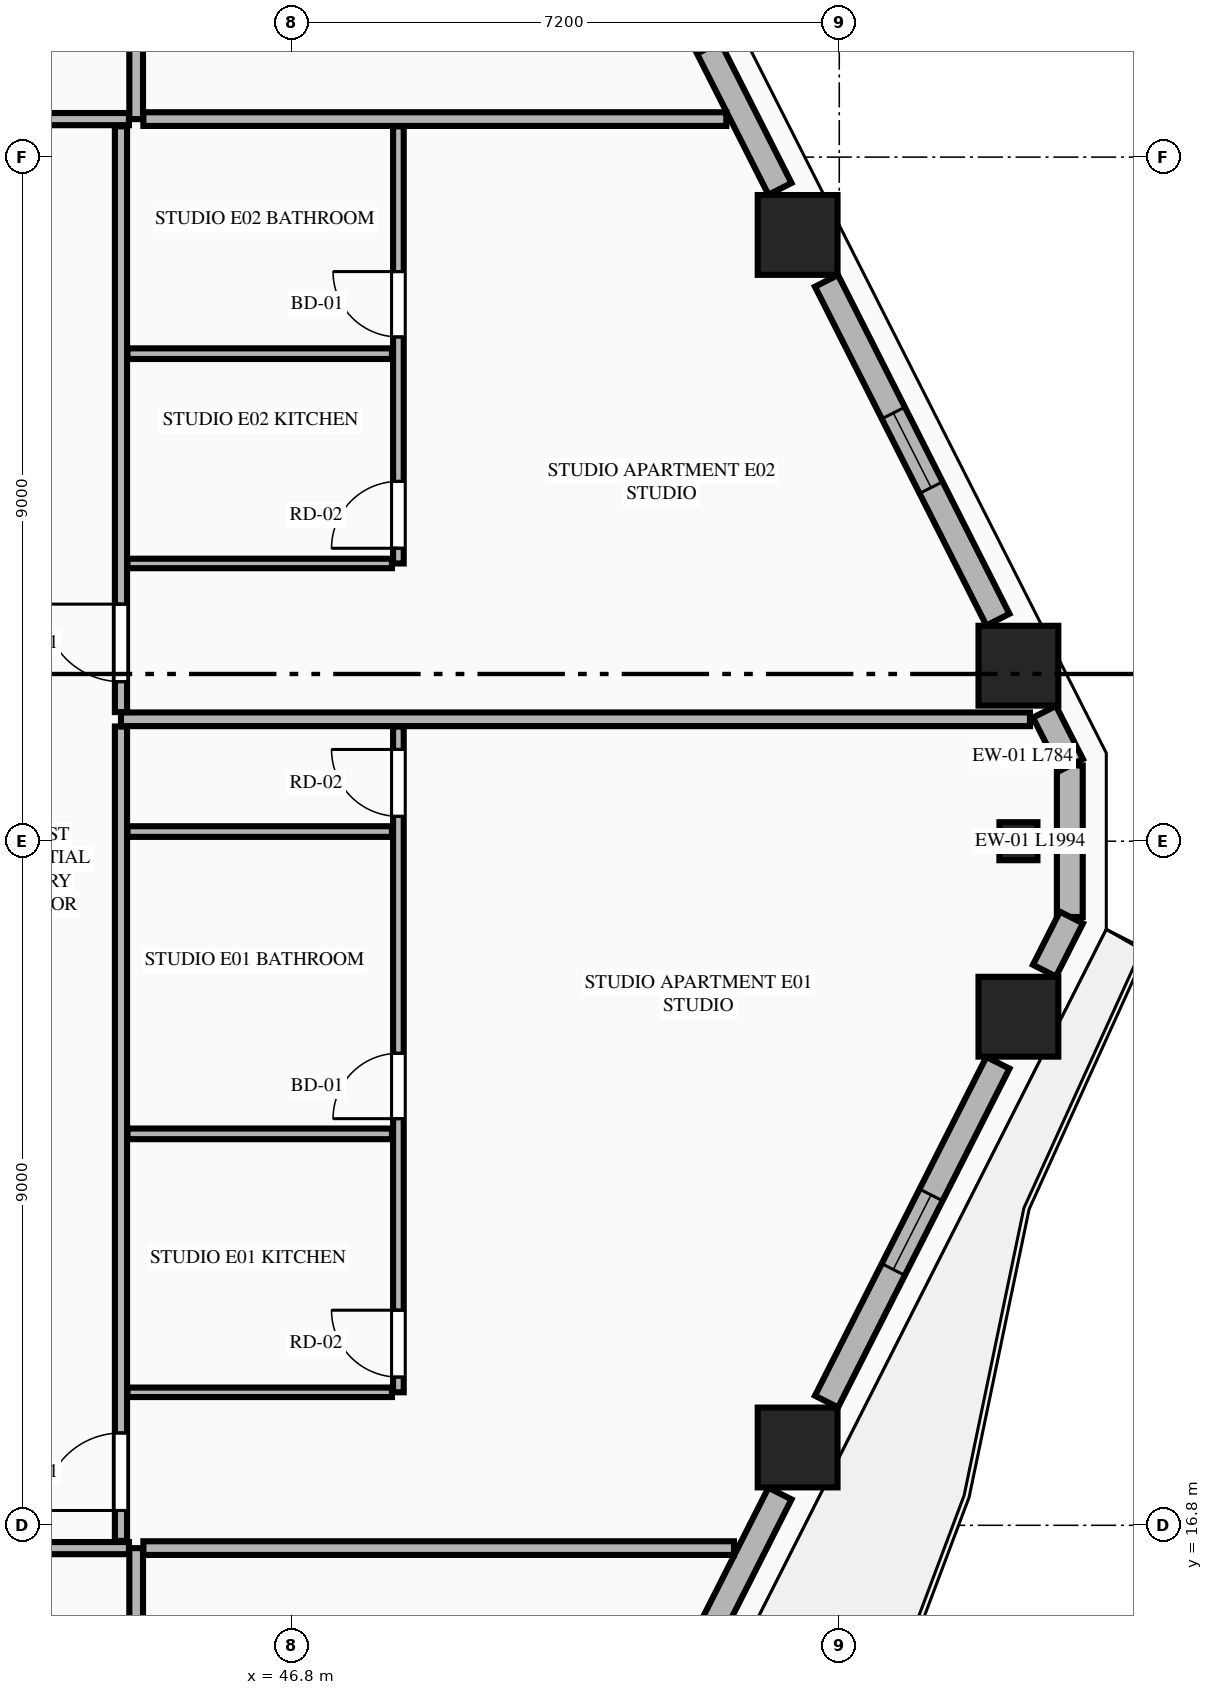
"""IFC4 building model, lengths in metres.
Left out: names, types, materials, properties, quantities, classifications, styles, units other than length and angle.
Written with IfcOpenShell. Run it as: python <this file> out.ifc"""

import sys

from ifc_helpers import new_model, si_unit, direction, frame, frame_2d, origin, origin_2d, place, context, subcontext, project, spatial, rectangle, extrude, element, fill, save


model = new_model("IFC4")
c1 = context("Model", 3, precision=1e-05, world=origin(), true_north=direction((0.0, 1.0)))
c2 = subcontext(c1, "Body", "Model", "MODEL_VIEW")
j1 = project(units=[si_unit("LENGTHUNIT", "METRE"), si_unit("PLANEANGLEUNIT", "RADIAN")], contexts=[c1])
p1 = place(None, origin())
s1 = spatial("IfcSite", under=j1, at=p1, CompositionType="ELEMENT")
p2 = place(p1, origin())
s2 = spatial("IfcBuilding", under=s1, at=p2, CompositionType="ELEMENT")
p3 = place(p2, frame((0.0, 0.0, 141.0)))
s3 = spatial("IfcBuildingStorey", under=s2, at=p3, CompositionType="ELEMENT", Elevation=141.0)
for number, where, z_axis, x_axis in (
    (1, (53.452, 17.824, 0.0), (0.0, 0.0, 1.0), (1.0, 0.0, 0.0)),
    (2, (56.357, 23.491, 0.0), (0.0, 0.0, 1.0), (1.0, 0.0, 0.0)),
    (3, (56.357, 28.109, 0.0), (0.0, 0.0, 1.0), (1.0, 0.0, 0.0)),
    (4, (53.452, 33.776, 0.0), (0.0, 0.0, 1.0), (1.0, 0.0, 0.0)),
):
    element("IfcColumn", number, at=place(p3, frame(where, z_axis=z_axis, x_axis=x_axis)), inside=s3, PredefinedType="COLUMN", context=c2, shape_type="SweptSolid", body=[
        extrude(rectangle(XDim=1.05, YDim=1.05, at=origin_2d()), origin(), (0.0, 0.0, 1.0), 3.55),
    ])
p4 = place(p3, frame((56.357, 25.8, 0.0), z_axis=(0.0, 0.0, 1.0), x_axis=(0.0, 1.0, 0.0)))
e5 = element("IfcColumn", 5, at=p4, inside=s3, PredefinedType="PILASTER", context=c2, shape_type="SweptSolid", body=[
    extrude(rectangle(XDim=0.5, YDim=0.35, at=origin_2d()), origin(), (0.0, 0.0, 1.0), 3.55),
])
p5 = place(p3, frame((57.033, 24.803, 0.0), z_axis=(0.0, 0.0, 1.0), x_axis=(0.0, 1.0, 0.0)))
e6 = element("IfcWall", 6, at=p5, inside=s3, PredefinedType="STANDARD", context=c2, shape_type="SweptSolid", body=[
    extrude(rectangle(XDim=1.994, YDim=0.34, at=frame_2d((0.997, 0.0))), origin(), (0.0, 0.0, 1.0), 3.34),
])
p6 = place(p3, frame((50.863, 12.561, 0.0), z_axis=(0.0, 0.0, 1.0), x_axis=(0.451567731634, 0.892236842855, 0.0)))
e7 = element("IfcWall", 7, at=p6, inside=s3, PredefinedType="STANDARD", context=c2, shape_type="SweptSolid", body=[
    extrude(rectangle(XDim=5.219, YDim=0.34, at=frame_2d((2.61, 0.0))), origin(), (0.0, 0.0, 1.0), 2.797),
])
p7 = place(p6, frame((1.532, 0.0, 0.0)))
e8 = element("IfcOpeningElement", 8, at=p7, cuts=e7, PredefinedType="OPENING", context=c2, shape_type="SweptSolid", body=[
    extrude(rectangle(XDim=1.1, YDim=2.25, at=frame_2d((0.55, 1.125))), frame((0.0, 0.18, 0.0), z_axis=(0.0, -1.0, 0.0), x_axis=(1.0, 0.0, 0.0)), (0.0, 0.0, 1.0), 0.36),
])
p8 = place(p3, frame((53.832, 18.428, 0.0), z_axis=(0.0, 0.0, 1.0), x_axis=(0.451431617681, 0.892305718102, 0.0)))
e9 = element("IfcWall", 9, at=p8, inside=s3, PredefinedType="STANDARD", context=c2, shape_type="SweptSolid", body=[
    extrude(rectangle(XDim=4.995, YDim=0.34, at=frame_2d((2.498, 0.0))), origin(), (0.0, 0.0, 1.0), 2.797),
])
p9 = place(p8, frame((1.947, 0.0, 0.75)))
e10 = element("IfcOpeningElement", 10, at=p9, cuts=e9, PredefinedType="OPENING", context=c2, shape_type="SweptSolid", body=[
    extrude(rectangle(XDim=1.1, YDim=1.897, at=frame_2d((0.55, 0.948))), frame((0.0, 0.18, 0.0), z_axis=(0.0, -1.0, 0.0), x_axis=(1.0, 0.0, 0.0)), (0.0, 0.0, 1.0), 0.36),
])
for number, where, z_axis, x_axis in (
    (11, (56.7, 24.097, 0.0), (0.0, 0.0, 1.0), (0.452, 0.892, 0.0)),
    (12, (57.054, 26.804, 0.0), (0.0, 0.0, 1.0), (-0.452, 0.892, 0.0)),
):
    element("IfcWall", number, at=place(p3, frame(where, z_axis=z_axis, x_axis=x_axis)), inside=s3, PredefinedType="STANDARD", context=c2, shape_type="SweptSolid", body=[
        extrude(rectangle(XDim=0.783, YDim=0.34, at=frame_2d((0.392, 0.0))), origin(), (0.0, 0.0, 1.0), 3.34),
    ])
p10 = place(p3, frame((56.087, 28.715, 0.0), z_axis=(0.0, 0.0, 1.0), x_axis=(-0.451431617681, 0.892305718102, 0.0)))
e13 = element("IfcWall", 13, at=p10, inside=s3, PredefinedType="STANDARD", context=c2, shape_type="SweptSolid", body=[
    extrude(rectangle(XDim=4.995, YDim=0.34, at=frame_2d((2.498, 0.0))), origin(), (0.0, 0.0, 1.0), 2.797),
])
p11 = place(p10, frame((1.947, 0.0, 0.75)))
e14 = element("IfcOpeningElement", 14, at=p11, cuts=e13, PredefinedType="OPENING", context=c2, shape_type="SweptSolid", body=[
    extrude(rectangle(XDim=1.1, YDim=1.897, at=frame_2d((0.55, 0.948))), frame((0.0, 0.18, 0.0), z_axis=(0.0, -1.0, 0.0), x_axis=(1.0, 0.0, 0.0)), (0.0, 0.0, 1.0), 0.36),
])
p12 = place(p3, frame((53.22, 34.382, 0.0), z_axis=(0.0, 0.0, 1.0), x_axis=(-0.451567731634, 0.892236842855, 0.0)))
e15 = element("IfcWall", 15, at=p12, inside=s3, PredefinedType="STANDARD", context=c2, shape_type="SweptSolid", body=[
    extrude(rectangle(XDim=5.219, YDim=0.34, at=frame_2d((2.61, 0.0))), origin(), (0.0, 0.0, 1.0), 2.797),
])
p13 = place(p12, frame((2.06, 0.0, 0.75)))
e16 = element("IfcOpeningElement", 16, at=p13, cuts=e15, PredefinedType="OPENING", context=c2, shape_type="SweptSolid", body=[
    extrude(rectangle(XDim=1.1, YDim=1.897, at=frame_2d((0.55, 0.948))), frame((0.0, 0.18, 0.0), z_axis=(0.0, -1.0, 0.0), x_axis=(1.0, 0.0, 0.0)), (0.0, 0.0, 1.0), 0.36),
])
p14 = place(p3, frame((44.75, 4.105, 0.0), z_axis=(0.0, 0.0, 1.0), x_axis=(0.0, 1.0, 0.0)))
e17 = element("IfcWall", 17, at=p14, inside=s3, PredefinedType="PARTITIONING", context=c2, shape_type="SweptSolid", body=[
    extrude(rectangle(XDim=12.395, YDim=0.18, at=frame_2d((6.198, 0.0))), origin(), (0.0, 0.0, 1.0), 3.34),
])
p15 = place(p3, frame((20.145, 16.5, 0.0), z_axis=(0.0, 0.0, 1.0), x_axis=(1.0, 0.0, 0.0)))
e18 = element("IfcWall", 18, at=p15, inside=s3, PredefinedType="PARTITIONING", context=c2, shape_type="SweptSolid", body=[
    extrude(rectangle(XDim=24.51, YDim=0.16, at=frame_2d((12.255, 0.0))), origin(), (0.0, 0.0, 1.0), 3.34),
])
p16 = place(p15, frame((0.405, 0.0, 0.0)))
e19 = element("IfcOpeningElement", 19, at=p16, cuts=e18, PredefinedType="OPENING", context=c2, shape_type="SweptSolid", body=[
    extrude(rectangle(XDim=1.35, YDim=2.35, at=frame_2d((0.675, 1.175))), frame((0.0, 0.09, 0.0), z_axis=(0.0, -1.0, 0.0), x_axis=(1.0, 0.0, 0.0)), (0.0, 0.0, 1.0), 0.18),
])
p17 = place(p3, frame((44.75, 35.3, 0.0), z_axis=(0.0, 0.0, 1.0), x_axis=(0.0, 1.0, 0.0)))
e20 = element("IfcWall", 20, at=p17, inside=s3, PredefinedType="PARTITIONING", context=c2, shape_type="SweptSolid", body=[
    extrude(rectangle(XDim=12.195, YDim=0.18, at=frame_2d((6.098, 0.0))), origin(), (0.0, 0.0, 1.0), 3.34),
])
p18 = place(p3, frame((20.145, 35.3, 0.0), z_axis=(0.0, 0.0, 1.0), x_axis=(1.0, 0.0, 0.0)))
e21 = element("IfcWall", 21, at=p18, inside=s3, PredefinedType="PARTITIONING", context=c2, shape_type="SweptSolid", body=[
    extrude(rectangle(XDim=24.51, YDim=0.16, at=frame_2d((12.255, 0.0))), origin(), (0.0, 0.0, 1.0), 3.34),
])
p19 = place(p18, frame((0.405, 0.0, 0.0)))
e22 = element("IfcOpeningElement", 22, at=p19, cuts=e21, PredefinedType="OPENING", context=c2, shape_type="SweptSolid", body=[
    extrude(rectangle(XDim=1.35, YDim=2.35, at=frame_2d((0.675, 1.175))), frame((0.0, 0.09, 0.0), z_axis=(0.0, -1.0, 0.0), x_axis=(1.0, 0.0, 0.0)), (0.0, 0.0, 1.0), 0.18),
])
p20 = place(p3, frame((44.845, 16.5, 0.0), z_axis=(0.0, 0.0, 1.0), x_axis=(1.0, 0.0, 0.0)))
e23 = element("IfcWall", 23, at=p20, inside=s3, PredefinedType="PARTITIONING", context=c2, shape_type="SweptSolid", body=[
    extrude(rectangle(XDim=7.77, YDim=0.18, at=frame_2d((3.885, 0.0))), origin(), (0.0, 0.0, 1.0), 3.34),
])
p21 = place(p3, frame((44.845, 35.3, 0.0), z_axis=(0.0, 0.0, 1.0), x_axis=(1.0, 0.0, 0.0)))
e24 = element("IfcWall", 24, at=p21, inside=s3, PredefinedType="PARTITIONING", context=c2, shape_type="SweptSolid", body=[
    extrude(rectangle(XDim=7.669, YDim=0.18, at=frame_2d((3.834, 0.0))), origin(), (0.0, 0.0, 1.0), 3.34),
])
p22 = place(p3, frame((44.55, 16.595, 0.0), z_axis=(0.0, 0.0, 1.0), x_axis=(0.0, 1.0, 0.0)))
e25 = element("IfcWall", 25, at=p22, inside=s3, PredefinedType="PARTITIONING", context=c2, shape_type="SweptSolid", body=[
    extrude(rectangle(XDim=10.714, YDim=0.16, at=frame_2d((5.357, 0.0))), origin(), (0.0, 0.0, 1.0), 3.34),
])
p23 = place(p22, frame((0.4, 0.0, 0.0)))
e26 = element("IfcOpeningElement", 26, at=p23, cuts=e25, PredefinedType="OPENING", context=c2, shape_type="SweptSolid", body=[
    extrude(rectangle(XDim=1.02, YDim=2.25, at=frame_2d((0.51, 1.125))), frame((0.0, 0.09, 0.0), z_axis=(0.0, -1.0, 0.0), x_axis=(1.0, 0.0, 0.0)), (0.0, 0.0, 1.0), 0.18),
])
p24 = place(p3, frame((44.635, 18.55, 0.0), z_axis=(0.0, 0.0, 1.0), x_axis=(1.0, 0.0, 0.0)))
e27 = element("IfcWall", 27, at=p24, inside=s3, PredefinedType="PARTITIONING", context=c2, shape_type="SweptSolid", body=[
    extrude(rectangle(XDim=3.48, YDim=0.125, at=frame_2d((1.74, 0.0))), origin(), (0.0, 0.0, 1.0), 2.722),
])
p25 = place(p3, frame((48.2, 18.55, 0.0), z_axis=(0.0, 0.0, 1.0), x_axis=(0.0, 1.0, 0.0)))
e28 = element("IfcWall", 28, at=p25, inside=s3, PredefinedType="PLUMBINGWALL", context=c2, shape_type="SweptSolid", body=[
    extrude(rectangle(XDim=8.759, YDim=0.14, at=frame_2d((4.379, 0.0))), origin(), (0.0, 0.0, 1.0), 3.34),
])
p26 = place(p25, frame((3.6, 0.0, 0.0)))
e29 = element("IfcOpeningElement", 29, at=p26, cuts=e28, PredefinedType="OPENING", context=c2, shape_type="SweptSolid", body=[
    extrude(rectangle(XDim=0.86, YDim=2.1, at=frame_2d((0.43, 1.05))), frame((0.0, 0.08, 0.0), z_axis=(0.0, -1.0, 0.0), x_axis=(1.0, 0.0, 0.0)), (0.0, 0.0, 1.0), 0.16),
])
p27 = place(p25, frame((7.577, 0.0, 0.0)))
e30 = element("IfcOpeningElement", 30, at=p27, cuts=e28, PredefinedType="OPENING", context=c2, shape_type="SweptSolid", body=[
    extrude(rectangle(XDim=0.88, YDim=2.15, at=frame_2d((0.44, 1.075))), frame((0.0, 0.08, 0.0), z_axis=(0.0, -1.0, 0.0), x_axis=(1.0, 0.0, 0.0)), (0.0, 0.0, 1.0), 0.16),
])
p28 = place(p25, frame((0.2, 0.0, 0.0)))
e31 = element("IfcOpeningElement", 31, at=p28, cuts=e28, PredefinedType="OPENING", context=c2, shape_type="SweptSolid", body=[
    extrude(rectangle(XDim=0.88, YDim=2.15, at=frame_2d((0.44, 1.075))), frame((0.0, 0.08, 0.0), z_axis=(0.0, -1.0, 0.0), x_axis=(1.0, 0.0, 0.0)), (0.0, 0.0, 1.0), 0.16),
])
for number, where, z_axis, x_axis in (
    (32, (44.635, 21.95, 0.0), (0.0, 0.0, 1.0), (1.0, 0.0, 0.0)),
    (33, (44.635, 25.927, 0.0), (0.0, 0.0, 1.0), (1.0, 0.0, 0.0)),
):
    element("IfcWall", number, at=place(p3, frame(where, z_axis=z_axis, x_axis=x_axis)), inside=s3, PredefinedType="PLUMBINGWALL", context=c2, shape_type="SweptSolid", body=[
        extrude(rectangle(XDim=3.48, YDim=0.14, at=frame_2d((1.74, 0.0))), origin(), (0.0, 0.0, 1.0), 3.34),
    ])
p29 = place(p3, frame((44.55, 27.404, 0.0), z_axis=(0.0, 0.0, 1.0), x_axis=(1.0, 0.0, 0.0)))
e34 = element("IfcWall", 34, at=p29, inside=s3, PredefinedType="PARTITIONING", context=c2, shape_type="SweptSolid", body=[
    extrude(rectangle(XDim=11.959, YDim=0.18, at=frame_2d((5.979, 0.0))), origin(), (0.0, 0.0, 1.0), 3.34),
])
p30 = place(p3, frame((44.55, 27.499, 0.0), z_axis=(0.0, 0.0, 1.0), x_axis=(0.0, 1.0, 0.0)))
e35 = element("IfcWall", 35, at=p30, inside=s3, PredefinedType="PARTITIONING", context=c2, shape_type="SweptSolid", body=[
    extrude(rectangle(XDim=7.706, YDim=0.16, at=frame_2d((3.853, 0.0))), origin(), (0.0, 0.0, 1.0), 3.34),
])
p31 = place(p30, frame((0.4, 0.0, 0.0)))
e36 = element("IfcOpeningElement", 36, at=p31, cuts=e35, PredefinedType="OPENING", context=c2, shape_type="SweptSolid", body=[
    extrude(rectangle(XDim=1.02, YDim=2.25, at=frame_2d((0.51, 1.125))), frame((0.0, 0.09, 0.0), z_axis=(0.0, -1.0, 0.0), x_axis=(1.0, 0.0, 0.0)), (0.0, 0.0, 1.0), 0.18),
])
p32 = place(p3, frame((44.635, 29.454, 0.0), z_axis=(0.0, 0.0, 1.0), x_axis=(1.0, 0.0, 0.0)))
e37 = element("IfcWall", 37, at=p32, inside=s3, PredefinedType="PARTITIONING", context=c2, shape_type="SweptSolid", body=[
    extrude(rectangle(XDim=3.48, YDim=0.125, at=frame_2d((1.74, 0.0))), origin(), (0.0, 0.0, 1.0), 3.34),
])
p33 = place(p3, frame((48.2, 29.454, 0.0), z_axis=(0.0, 0.0, 1.0), x_axis=(0.0, 1.0, 0.0)))
e38 = element("IfcWall", 38, at=p33, inside=s3, PredefinedType="PLUMBINGWALL", context=c2, shape_type="SweptSolid", body=[
    extrude(rectangle(XDim=5.751, YDim=0.14, at=frame_2d((2.875, 0.0))), origin(), (0.0, 0.0, 1.0), 3.34),
])
p34 = place(p33, frame((2.98, 0.0, 0.0)))
e39 = element("IfcOpeningElement", 39, at=p34, cuts=e38, PredefinedType="OPENING", context=c2, shape_type="SweptSolid", body=[
    extrude(rectangle(XDim=0.86, YDim=2.1, at=frame_2d((0.43, 1.05))), frame((0.0, 0.08, 0.0), z_axis=(0.0, -1.0, 0.0), x_axis=(1.0, 0.0, 0.0)), (0.0, 0.0, 1.0), 0.16),
])
p35 = place(p33, frame((0.2, 0.0, 0.0)))
e40 = element("IfcOpeningElement", 40, at=p35, cuts=e38, PredefinedType="OPENING", context=c2, shape_type="SweptSolid", body=[
    extrude(rectangle(XDim=0.88, YDim=2.15, at=frame_2d((0.44, 1.075))), frame((0.0, 0.08, 0.0), z_axis=(0.0, -1.0, 0.0), x_axis=(1.0, 0.0, 0.0)), (0.0, 0.0, 1.0), 0.16),
])
p36 = place(p3, frame((44.635, 32.214, 0.0), z_axis=(0.0, 0.0, 1.0), x_axis=(1.0, 0.0, 0.0)))
e41 = element("IfcWall", 41, at=p36, inside=s3, PredefinedType="PLUMBINGWALL", context=c2, shape_type="SweptSolid", body=[
    extrude(rectangle(XDim=3.48, YDim=0.14, at=frame_2d((1.74, 0.0))), origin(), (0.0, 0.0, 1.0), 3.34),
])
p37 = place(p9, origin())
e42 = element("IfcWindow", 42, at=p37, inside=s3, PartitioningType="SINGLE_PANEL", PredefinedType="WINDOW", context=c2, shape_type="SweptSolid", body=[
    extrude(rectangle(XDim=1.1, YDim=1.897, at=frame_2d((0.55, 0.948))), frame((0.0, 0.03, 0.0), z_axis=(0.0, -1.0, 0.0), x_axis=(1.0, 0.0, 0.0)), (0.0, 0.0, 1.0), 0.06),
])
fill(e10, e42)
p38 = place(p11, origin())
e43 = element("IfcWindow", 43, at=p38, inside=s3, PartitioningType="SINGLE_PANEL", PredefinedType="WINDOW", context=c2, shape_type="SweptSolid", body=[
    extrude(rectangle(XDim=1.1, YDim=1.897, at=frame_2d((0.55, 0.948))), frame((0.0, 0.03, 0.0), z_axis=(0.0, -1.0, 0.0), x_axis=(1.0, 0.0, 0.0)), (0.0, 0.0, 1.0), 0.06),
])
fill(e14, e43)
p39 = place(p26, origin())
e44 = element("IfcDoor", 44, at=p39, inside=s3, OperationType="SINGLE_SWING_LEFT", PredefinedType="DOOR", context=c2, shape_type="SweptSolid", body=[
    extrude(rectangle(XDim=0.86, YDim=2.1, at=frame_2d((0.43, 1.05))), frame((0.0, 0.025, 0.0), z_axis=(0.0, -1.0, 0.0), x_axis=(1.0, 0.0, 0.0)), (0.0, 0.0, 1.0), 0.05),
])
fill(e29, e44)
p40 = place(p27, origin())
e45 = element("IfcDoor", 45, at=p40, inside=s3, OperationType="SINGLE_SWING_RIGHT", PredefinedType="DOOR", context=c2, shape_type="SweptSolid", body=[
    extrude(rectangle(XDim=0.88, YDim=2.15, at=frame_2d((0.44, 1.075))), frame((0.0, 0.025, 0.0), z_axis=(0.0, -1.0, 0.0), x_axis=(1.0, 0.0, 0.0)), (0.0, 0.0, 1.0), 0.05),
])
fill(e30, e45)
p41 = place(p23, origin())
e46 = element("IfcDoor", 46, at=p41, inside=s3, OperationType="SINGLE_SWING_LEFT", PredefinedType="DOOR", context=c2, shape_type="SweptSolid", body=[
    extrude(rectangle(XDim=1.02, YDim=2.25, at=frame_2d((0.51, 1.125))), frame((0.0, 0.025, 0.0), z_axis=(0.0, -1.0, 0.0), x_axis=(1.0, 0.0, 0.0)), (0.0, 0.0, 1.0), 0.05),
])
fill(e26, e46)
p42 = place(p28, origin())
e47 = element("IfcDoor", 47, at=p42, inside=s3, OperationType="SINGLE_SWING_RIGHT", PredefinedType="DOOR", context=c2, shape_type="SweptSolid", body=[
    extrude(rectangle(XDim=0.88, YDim=2.15, at=frame_2d((0.44, 1.075))), frame((0.0, 0.025, 0.0), z_axis=(0.0, -1.0, 0.0), x_axis=(1.0, 0.0, 0.0)), (0.0, 0.0, 1.0), 0.05),
])
fill(e31, e47)
p43 = place(p34, origin())
e48 = element("IfcDoor", 48, at=p43, inside=s3, OperationType="SINGLE_SWING_RIGHT", PredefinedType="DOOR", context=c2, shape_type="SweptSolid", body=[
    extrude(rectangle(XDim=0.86, YDim=2.1, at=frame_2d((0.43, 1.05))), frame((0.0, 0.025, 0.0), z_axis=(0.0, -1.0, 0.0), x_axis=(1.0, 0.0, 0.0)), (0.0, 0.0, 1.0), 0.05),
])
fill(e39, e48)
p44 = place(p31, origin())
e49 = element("IfcDoor", 49, at=p44, inside=s3, OperationType="SINGLE_SWING_RIGHT", PredefinedType="DOOR", context=c2, shape_type="SweptSolid", body=[
    extrude(rectangle(XDim=1.02, YDim=2.25, at=frame_2d((0.51, 1.125))), frame((0.0, 0.025, 0.0), z_axis=(0.0, -1.0, 0.0), x_axis=(1.0, 0.0, 0.0)), (0.0, 0.0, 1.0), 0.05),
])
fill(e36, e49)
p45 = place(p35, origin())
e50 = element("IfcDoor", 50, at=p45, inside=s3, OperationType="SINGLE_SWING_LEFT", PredefinedType="DOOR", context=c2, shape_type="SweptSolid", body=[
    extrude(rectangle(XDim=0.88, YDim=2.15, at=frame_2d((0.44, 1.075))), frame((0.0, 0.025, 0.0), z_axis=(0.0, -1.0, 0.0), x_axis=(1.0, 0.0, 0.0)), (0.0, 0.0, 1.0), 0.05),
])
fill(e40, e50)
save(model, sys.argv[1])
